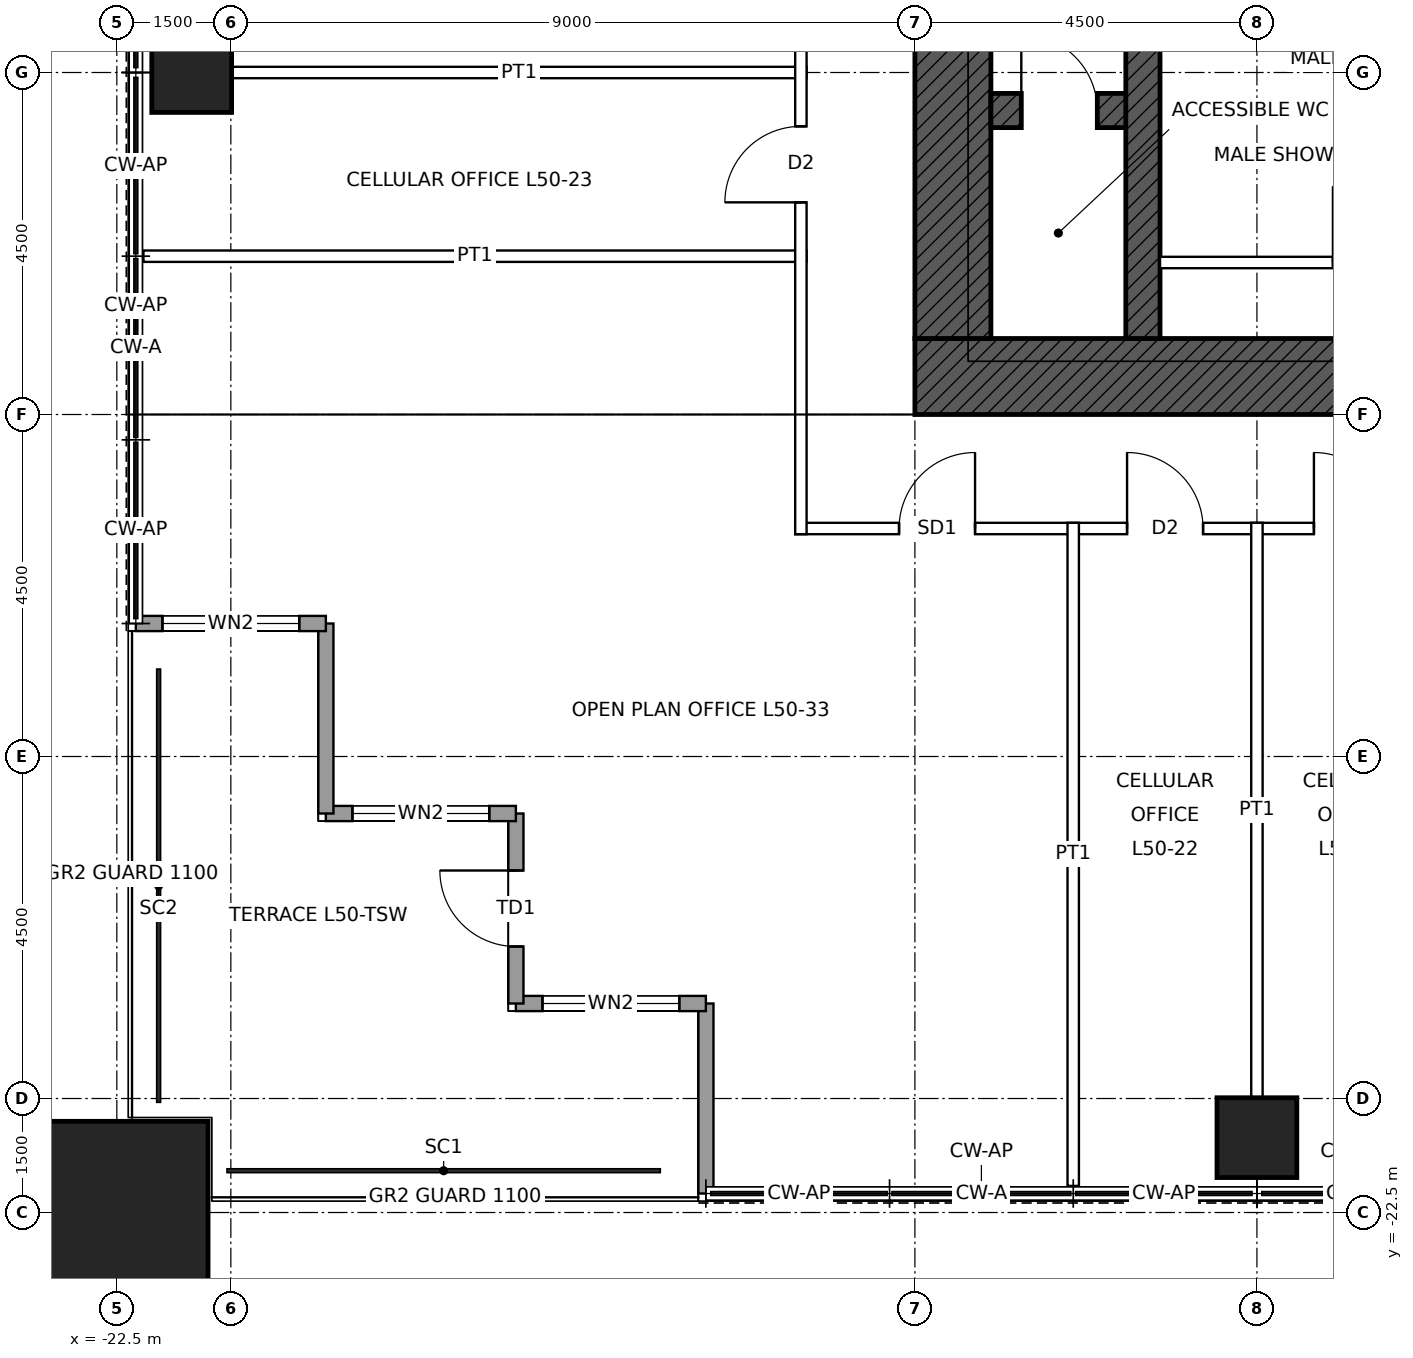
"""IFC4 building model, lengths in metres.
Left out: names, types, materials, properties, quantities, classifications, styles, units other than length and angle.
Written with IfcOpenShell. Run it as: python <this file> out.ifc"""

import sys

from ifc_helpers import new_model, si_unit, direction, frame, frame_2d, origin, origin_2d, place, context, subcontext, project, spatial, rectangle, hollow_rectangle, extrude, element, fill, save


model = new_model("IFC4")
c1 = context("Model", 3, precision=1e-05, world=origin(), true_north=direction((0.0, 1.0)))
c2 = subcontext(c1, "Body", "Model", "MODEL_VIEW")
j1 = project(units=[si_unit("LENGTHUNIT", "METRE"), si_unit("PLANEANGLEUNIT", "RADIAN")], contexts=[c1])
p1 = place(None, origin())
s1 = spatial("IfcSite", under=j1, at=p1, CompositionType="ELEMENT")
p2 = place(p1, origin())
s2 = spatial("IfcBuilding", under=s1, at=p2, CompositionType="ELEMENT")
p3 = place(p2, frame((0.0, 0.0, 233.9)))
s3 = spatial("IfcBuildingStorey", under=s2, at=p3, CompositionType="ELEMENT", Elevation=233.9)
p4 = place(p3, frame((-22.5, -22.5, 0.0), z_axis=(0.0, 0.0, 1.0), x_axis=(1.0, 0.0, 0.0)))
e1 = element("IfcColumn", 1, at=p4, inside=s3, PredefinedType="COLUMN", context=c2, shape_type="SweptSolid", body=[
    extrude(hollow_rectangle(XDim=2.4, YDim=2.4, WallThickness=0.12, at=origin_2d()), origin(), (0.0, 0.0, 1.0), 4.0),
])
for number, where, z_axis, x_axis in (
    (2, (-7.5, -21.515, 0.0), (0.0, 0.0, 1.0), (1.0, 0.0, 0.0)),
    (3, (-21.515, -7.5, 0.0), (0.0, 0.0, 1.0), (1.0, 0.0, 0.0)),
):
    element("IfcColumn", number, at=place(p3, frame(where, z_axis=z_axis, x_axis=x_axis)), inside=s3, PredefinedType="COLUMN", context=c2, shape_type="SweptSolid", body=[
        extrude(hollow_rectangle(XDim=1.05, YDim=1.05, WallThickness=0.07, at=origin_2d()), origin(), (0.0, 0.0, 1.0), 4.0),
    ])
p5 = place(p3, frame((12.0, -11.5, 0.0), z_axis=(0.0, 0.0, 1.0), x_axis=(-1.0, 0.0, 0.0)))
e4 = element("IfcWall", 4, at=p5, inside=s3, PredefinedType="SHEAR", context=c2, shape_type="SweptSolid", body=[
    extrude(rectangle(XDim=24.0, YDim=1.0, at=frame_2d((12.0, 0.0))), origin(), (0.0, 0.0, 1.0), 4.0),
])
p6 = place(p5, frame((11.5, 0.0, 0.0)))
e5 = element("IfcOpeningElement", 5, at=p6, cuts=e4, PredefinedType="OPENING", context=c2, shape_type="SweptSolid", body=[
    extrude(rectangle(XDim=1.0, YDim=2.1, at=frame_2d((0.5, 1.05))), frame((0.0, 0.51, 0.0), z_axis=(0.0, -1.0, 0.0), x_axis=(1.0, 0.0, 0.0)), (0.0, 0.0, 1.0), 1.02),
])
p7 = place(p5, frame((1.0, 0.0, 0.0)))
e6 = element("IfcOpeningElement", 6, at=p7, cuts=e4, PredefinedType="OPENING", context=c2, shape_type="SweptSolid", body=[
    extrude(rectangle(XDim=1.0, YDim=2.4, at=frame_2d((0.5, 1.2))), frame((0.0, 0.51, 0.0), z_axis=(0.0, -1.0, 0.0), x_axis=(1.0, 0.0, 0.0)), (0.0, 0.0, 1.0), 1.02),
])
p8 = place(p3, frame((-11.5, -11.0, 0.0), z_axis=(0.0, 0.0, 1.0), x_axis=(0.0, 1.0, 0.0)))
e7 = element("IfcWall", 7, at=p8, inside=s3, PredefinedType="SHEAR", context=c2, shape_type="SweptSolid", body=[
    extrude(rectangle(XDim=22.0, YDim=1.0, at=frame_2d((11.0, 0.0))), origin(), (0.0, 0.0, 1.0), 4.0),
])
p9 = place(p8, frame((10.5, 0.0, 0.0)))
e8 = element("IfcOpeningElement", 8, at=p9, cuts=e7, PredefinedType="OPENING", context=c2, shape_type="SweptSolid", body=[
    extrude(rectangle(XDim=1.0, YDim=2.4, at=frame_2d((0.5, 1.2))), frame((0.0, 0.51, 0.0), z_axis=(0.0, -1.0, 0.0), x_axis=(1.0, 0.0, 0.0)), (0.0, 0.0, 1.0), 1.02),
])
p10 = place(p3, frame((-11.0, -8.0, 0.0), z_axis=(0.0, 0.0, 1.0), x_axis=(1.0, 0.0, 0.0)))
e9 = element("IfcWall", 9, at=p10, inside=s3, PredefinedType="SHEAR", context=c2, shape_type="SweptSolid", body=[
    extrude(rectangle(XDim=2.0, YDim=0.45, at=frame_2d((1.0, 0.0))), origin(), (0.0, 0.0, 1.0), 4.0),
])
p11 = place(p10, frame((0.4, 0.0, 0.0)))
e10 = element("IfcOpeningElement", 10, at=p11, cuts=e9, PredefinedType="OPENING", context=c2, shape_type="SweptSolid", body=[
    extrude(rectangle(XDim=1.0, YDim=2.1, at=frame_2d((0.5, 1.05))), frame((0.0, 0.235, 0.0), z_axis=(0.0, -1.0, 0.0), x_axis=(1.0, 0.0, 0.0)), (0.0, 0.0, 1.0), 0.47),
])
p12 = place(p3, frame((-9.0, -11.0, 0.0), z_axis=(0.0, 0.0, 1.0), x_axis=(0.0, 1.0, 0.0)))
e11 = element("IfcWall", 11, at=p12, inside=s3, PredefinedType="SHEAR", context=c2, shape_type="SweptSolid", body=[
    extrude(rectangle(XDim=6.5, YDim=0.45, at=frame_2d((3.25, 0.0))), origin(), (0.0, 0.0, 1.0), 4.0),
])
p13 = place(p12, frame((4.25, 0.0, 0.0)))
e12 = element("IfcOpeningElement", 12, at=p13, cuts=e11, PredefinedType="OPENING", context=c2, shape_type="SweptSolid", body=[
    extrude(rectangle(XDim=1.0, YDim=2.1, at=frame_2d((0.5, 1.05))), frame((0.0, 0.235, 0.0), z_axis=(0.0, -1.0, 0.0), x_axis=(1.0, 0.0, 0.0)), (0.0, 0.0, 1.0), 0.47),
])
p14 = place(p3, frame((-14.75, -22.25, 0.0), z_axis=(0.0, 0.0, 1.0), x_axis=(0.0, 1.0, 0.0)))
e13 = element("IfcWall", 13, at=p14, inside=s3, PredefinedType="SOLIDWALL", context=c2, shape_type="SweptSolid", body=[
    extrude(rectangle(XDim=2.5, YDim=0.2, at=frame_2d((1.25, 0.0))), origin(), (0.0, 0.0, 1.0), 3.85),
])
p15 = place(p3, frame((-14.75, -19.75, 0.0), z_axis=(0.0, 0.0, 1.0), x_axis=(-1.0, 0.0, 0.0)))
e14 = element("IfcWall", 14, at=p15, inside=s3, PredefinedType="SOLIDWALL", context=c2, shape_type="SweptSolid", body=[
    extrude(rectangle(XDim=2.5, YDim=0.2, at=frame_2d((1.25, 0.0))), origin(), (0.0, 0.0, 1.0), 3.85),
])
p16 = place(p15, frame((0.35, 0.0, 0.3)))
e15 = element("IfcOpeningElement", 15, at=p16, cuts=e14, PredefinedType="OPENING", context=c2, shape_type="SweptSolid", body=[
    extrude(rectangle(XDim=1.8, YDim=2.4, at=frame_2d((0.9, 1.2))), frame((0.0, 0.11, 0.0), z_axis=(0.0, -1.0, 0.0), x_axis=(1.0, 0.0, 0.0)), (0.0, 0.0, 1.0), 0.22),
])
p17 = place(p3, frame((-17.25, -19.75, 0.0), z_axis=(0.0, 0.0, 1.0), x_axis=(0.0, 1.0, 0.0)))
e16 = element("IfcWall", 16, at=p17, inside=s3, PredefinedType="SOLIDWALL", context=c2, shape_type="SweptSolid", body=[
    extrude(rectangle(XDim=2.5, YDim=0.2, at=frame_2d((1.25, 0.0))), origin(), (0.0, 0.0, 1.0), 3.85),
])
p18 = place(p17, frame((0.75, 0.0, 0.0)))
e17 = element("IfcOpeningElement", 17, at=p18, cuts=e16, PredefinedType="OPENING", context=c2, shape_type="SweptSolid", body=[
    extrude(rectangle(XDim=1.0, YDim=2.4, at=frame_2d((0.5, 1.2))), frame((0.0, 0.11, 0.0), z_axis=(0.0, -1.0, 0.0), x_axis=(1.0, 0.0, 0.0)), (0.0, 0.0, 1.0), 0.22),
])
p19 = place(p3, frame((-17.25, -17.25, 0.0), z_axis=(0.0, 0.0, 1.0), x_axis=(-1.0, 0.0, 0.0)))
e18 = element("IfcWall", 18, at=p19, inside=s3, PredefinedType="SOLIDWALL", context=c2, shape_type="SweptSolid", body=[
    extrude(rectangle(XDim=2.5, YDim=0.2, at=frame_2d((1.25, 0.0))), origin(), (0.0, 0.0, 1.0), 3.85),
])
p20 = place(p19, frame((0.35, 0.0, 0.3)))
e19 = element("IfcOpeningElement", 19, at=p20, cuts=e18, PredefinedType="OPENING", context=c2, shape_type="SweptSolid", body=[
    extrude(rectangle(XDim=1.8, YDim=2.4, at=frame_2d((0.9, 1.2))), frame((0.0, 0.11, 0.0), z_axis=(0.0, -1.0, 0.0), x_axis=(1.0, 0.0, 0.0)), (0.0, 0.0, 1.0), 0.22),
])
p21 = place(p3, frame((-19.75, -17.25, 0.0), z_axis=(0.0, 0.0, 1.0), x_axis=(0.0, 1.0, 0.0)))
e20 = element("IfcWall", 20, at=p21, inside=s3, PredefinedType="SOLIDWALL", context=c2, shape_type="SweptSolid", body=[
    extrude(rectangle(XDim=2.5, YDim=0.2, at=frame_2d((1.25, 0.0))), origin(), (0.0, 0.0, 1.0), 3.85),
])
p22 = place(p3, frame((-19.75, -14.75, 0.0), z_axis=(0.0, 0.0, 1.0), x_axis=(-1.0, 0.0, 0.0)))
e21 = element("IfcWall", 21, at=p22, inside=s3, PredefinedType="SOLIDWALL", context=c2, shape_type="SweptSolid", body=[
    extrude(rectangle(XDim=2.5, YDim=0.2, at=frame_2d((1.25, 0.0))), origin(), (0.0, 0.0, 1.0), 3.85),
])
p23 = place(p22, frame((0.35, 0.0, 0.3)))
e22 = element("IfcOpeningElement", 22, at=p23, cuts=e21, PredefinedType="OPENING", context=c2, shape_type="SweptSolid", body=[
    extrude(rectangle(XDim=1.8, YDim=2.4, at=frame_2d((0.9, 1.2))), frame((0.0, 0.11, 0.0), z_axis=(0.0, -1.0, 0.0), x_axis=(1.0, 0.0, 0.0)), (0.0, 0.0, 1.0), 0.22),
])
p24 = place(p3, frame((-13.575, -13.5, 0.0), z_axis=(0.0, 0.0, 1.0), x_axis=(1.0, 0.0, 0.0)))
e23 = element("IfcWall", 23, at=p24, inside=s3, PredefinedType="PARTITIONING", context=c2, shape_type="SweptSolid", body=[
    extrude(rectangle(XDim=27.15, YDim=0.15, at=frame_2d((13.575, 0.0))), origin(), (0.0, 0.0, 1.0), 3.85),
])
p25 = place(p24, frame((21.783, 0.0, 0.0)))
e24 = element("IfcOpeningElement", 24, at=p25, cuts=e23, PredefinedType="OPENING", context=c2, shape_type="SweptSolid", body=[
    extrude(rectangle(XDim=1.0, YDim=2.1, at=frame_2d((0.5, 1.05))), frame((0.0, 0.085, 0.0), z_axis=(0.0, -1.0, 0.0), x_axis=(1.0, 0.0, 0.0)), (0.0, 0.0, 1.0), 0.17),
])
p26 = place(p24, frame((19.325, 0.0, 0.0)))
e25 = element("IfcOpeningElement", 25, at=p26, cuts=e23, PredefinedType="OPENING", context=c2, shape_type="SweptSolid", body=[
    extrude(rectangle(XDim=1.0, YDim=2.1, at=frame_2d((0.5, 1.05))), frame((0.0, 0.085, 0.0), z_axis=(0.0, -1.0, 0.0), x_axis=(1.0, 0.0, 0.0)), (0.0, 0.0, 1.0), 0.17),
])
p27 = place(p24, frame((16.825, 0.0, 0.0)))
e26 = element("IfcOpeningElement", 26, at=p27, cuts=e23, PredefinedType="OPENING", context=c2, shape_type="SweptSolid", body=[
    extrude(rectangle(XDim=1.0, YDim=2.1, at=frame_2d((0.5, 1.05))), frame((0.0, 0.085, 0.0), z_axis=(0.0, -1.0, 0.0), x_axis=(1.0, 0.0, 0.0)), (0.0, 0.0, 1.0), 0.17),
])
p28 = place(p24, frame((14.675, 0.0, 0.0)))
e27 = element("IfcOpeningElement", 27, at=p28, cuts=e23, PredefinedType="OPENING", context=c2, shape_type="SweptSolid", body=[
    extrude(rectangle(XDim=1.0, YDim=2.1, at=frame_2d((0.5, 1.05))), frame((0.0, 0.085, 0.0), z_axis=(0.0, -1.0, 0.0), x_axis=(1.0, 0.0, 0.0)), (0.0, 0.0, 1.0), 0.17),
])
p29 = place(p24, frame((11.475, 0.0, 0.0)))
e28 = element("IfcOpeningElement", 28, at=p29, cuts=e23, PredefinedType="OPENING", context=c2, shape_type="SweptSolid", body=[
    extrude(rectangle(XDim=1.0, YDim=2.1, at=frame_2d((0.5, 1.05))), frame((0.0, 0.085, 0.0), z_axis=(0.0, -1.0, 0.0), x_axis=(1.0, 0.0, 0.0)), (0.0, 0.0, 1.0), 0.17),
])
p30 = place(p24, frame((9.325, 0.0, 0.0)))
e29 = element("IfcOpeningElement", 29, at=p30, cuts=e23, PredefinedType="OPENING", context=c2, shape_type="SweptSolid", body=[
    extrude(rectangle(XDim=1.0, YDim=2.1, at=frame_2d((0.5, 1.05))), frame((0.0, 0.085, 0.0), z_axis=(0.0, -1.0, 0.0), x_axis=(1.0, 0.0, 0.0)), (0.0, 0.0, 1.0), 0.17),
])
p31 = place(p24, frame((6.825, 0.0, 0.0)))
e30 = element("IfcOpeningElement", 30, at=p31, cuts=e23, PredefinedType="OPENING", context=c2, shape_type="SweptSolid", body=[
    extrude(rectangle(XDim=1.0, YDim=2.1, at=frame_2d((0.5, 1.05))), frame((0.0, 0.085, 0.0), z_axis=(0.0, -1.0, 0.0), x_axis=(1.0, 0.0, 0.0)), (0.0, 0.0, 1.0), 0.17),
])
p32 = place(p24, frame((4.366, 0.0, 0.0)))
e31 = element("IfcOpeningElement", 31, at=p32, cuts=e23, PredefinedType="OPENING", context=c2, shape_type="SweptSolid", body=[
    extrude(rectangle(XDim=1.0, YDim=2.1, at=frame_2d((0.5, 1.05))), frame((0.0, 0.085, 0.0), z_axis=(0.0, -1.0, 0.0), x_axis=(1.0, 0.0, 0.0)), (0.0, 0.0, 1.0), 0.17),
])
p33 = place(p24, frame((25.318, 0.0, 0.0)))
e32 = element("IfcOpeningElement", 32, at=p33, cuts=e23, PredefinedType="OPENING", context=c2, shape_type="SweptSolid", body=[
    extrude(rectangle(XDim=1.0, YDim=2.4, at=frame_2d((0.5, 1.2))), frame((0.0, 0.085, 0.0), z_axis=(0.0, -1.0, 0.0), x_axis=(1.0, 0.0, 0.0)), (0.0, 0.0, 1.0), 0.17),
])
p34 = place(p24, frame((1.366, 0.0, 0.0)))
e33 = element("IfcOpeningElement", 33, at=p34, cuts=e23, PredefinedType="OPENING", context=c2, shape_type="SweptSolid", body=[
    extrude(rectangle(XDim=1.0, YDim=2.4, at=frame_2d((0.5, 1.2))), frame((0.0, 0.085, 0.0), z_axis=(0.0, -1.0, 0.0), x_axis=(1.0, 0.0, 0.0)), (0.0, 0.0, 1.0), 0.17),
])
p35 = place(p3, frame((-22.15, -9.917, 0.0), z_axis=(0.0, 0.0, 1.0), x_axis=(1.0, 0.0, 0.0)))
e34 = element("IfcWall", 34, at=p35, inside=s3, PredefinedType="PARTITIONING", context=c2, shape_type="SweptSolid", body=[
    extrude(rectangle(XDim=8.725, YDim=0.15, at=frame_2d((4.362, 0.0))), origin(), (0.0, 0.0, 1.0), 3.85),
])
p36 = place(p3, frame((-20.99, -7.5, 0.0), z_axis=(0.0, 0.0, 1.0), x_axis=(1.0, 0.0, 0.0)))
e35 = element("IfcWall", 35, at=p36, inside=s3, PredefinedType="PARTITIONING", context=c2, shape_type="SweptSolid", body=[
    extrude(rectangle(XDim=7.565, YDim=0.15, at=frame_2d((3.782, 0.0))), origin(), (0.0, 0.0, 1.0), 3.238),
])
p37 = place(p3, frame((-13.5, -13.575, 0.0), z_axis=(0.0, 0.0, 1.0), x_axis=(0.0, 1.0, 0.0)))
e36 = element("IfcWall", 36, at=p37, inside=s3, PredefinedType="PARTITIONING", context=c2, shape_type="SweptSolid", body=[
    extrude(rectangle(XDim=13.65, YDim=0.15, at=frame_2d((6.825, 0.0))), origin(), (0.0, 0.0, 1.0), 3.85),
])
p38 = place(p37, frame((4.366, 0.0, 0.0)))
e37 = element("IfcOpeningElement", 37, at=p38, cuts=e36, PredefinedType="OPENING", context=c2, shape_type="SweptSolid", body=[
    extrude(rectangle(XDim=1.0, YDim=2.1, at=frame_2d((0.5, 1.05))), frame((0.0, 0.085, 0.0), z_axis=(0.0, -1.0, 0.0), x_axis=(1.0, 0.0, 0.0)), (0.0, 0.0, 1.0), 0.17),
])
p39 = place(p37, frame((6.825, 0.0, 0.0)))
e38 = element("IfcOpeningElement", 38, at=p39, cuts=e36, PredefinedType="OPENING", context=c2, shape_type="SweptSolid", body=[
    extrude(rectangle(XDim=1.0, YDim=2.1, at=frame_2d((0.5, 1.05))), frame((0.0, 0.085, 0.0), z_axis=(0.0, -1.0, 0.0), x_axis=(1.0, 0.0, 0.0)), (0.0, 0.0, 1.0), 0.17),
])
p40 = place(p37, frame((9.325, 0.0, 0.0)))
e39 = element("IfcOpeningElement", 39, at=p40, cuts=e36, PredefinedType="OPENING", context=c2, shape_type="SweptSolid", body=[
    extrude(rectangle(XDim=1.0, YDim=2.1, at=frame_2d((0.5, 1.05))), frame((0.0, 0.085, 0.0), z_axis=(0.0, -1.0, 0.0), x_axis=(1.0, 0.0, 0.0)), (0.0, 0.0, 1.0), 0.17),
])
p41 = place(p37, frame((11.475, 0.0, 0.0)))
e40 = element("IfcOpeningElement", 40, at=p41, cuts=e36, PredefinedType="OPENING", context=c2, shape_type="SweptSolid", body=[
    extrude(rectangle(XDim=1.0, YDim=2.1, at=frame_2d((0.5, 1.05))), frame((0.0, 0.085, 0.0), z_axis=(0.0, -1.0, 0.0), x_axis=(1.0, 0.0, 0.0)), (0.0, 0.0, 1.0), 0.17),
])
p42 = place(p3, frame((-9.917, -22.15, 0.0), z_axis=(0.0, 0.0, 1.0), x_axis=(0.0, 1.0, 0.0)))
e41 = element("IfcWall", 41, at=p42, inside=s3, PredefinedType="PARTITIONING", context=c2, shape_type="SweptSolid", body=[
    extrude(rectangle(XDim=8.725, YDim=0.15, at=frame_2d((4.362, 0.0))), origin(), (0.0, 0.0, 1.0), 3.85),
])
p43 = place(p3, frame((-7.5, -20.99, 0.0), z_axis=(0.0, 0.0, 1.0), x_axis=(0.0, 1.0, 0.0)))
e42 = element("IfcWall", 42, at=p43, inside=s3, PredefinedType="PARTITIONING", context=c2, shape_type="SweptSolid", body=[
    extrude(rectangle(XDim=7.565, YDim=0.15, at=frame_2d((3.782, 0.0))), origin(), (0.0, 0.0, 1.0), 3.238),
])
p44 = place(p3, frame((-8.775, -10.0, 0.0), z_axis=(0.0, 0.0, 1.0), x_axis=(1.0, 0.0, 0.0)))
e43 = element("IfcWall", 43, at=p44, inside=s3, PredefinedType="PARTITIONING", context=c2, shape_type="SweptSolid", body=[
    extrude(rectangle(XDim=5.55, YDim=0.15, at=frame_2d((2.775, 0.0))), origin(), (0.0, 0.0, 1.0), 3.75),
])
p45 = place(p44, frame((2.275, 0.0, 0.0)))
e44 = element("IfcOpeningElement", 44, at=p45, cuts=e43, PredefinedType="OPENING", context=c2, shape_type="SweptSolid", body=[
    extrude(rectangle(XDim=1.0, YDim=2.1, at=frame_2d((0.5, 1.05))), frame((0.0, 0.085, 0.0), z_axis=(0.0, -1.0, 0.0), x_axis=(1.0, 0.0, 0.0)), (0.0, 0.0, 1.0), 0.17),
])
p46 = place(p16, origin())
e45 = element("IfcWindow", 45, at=p46, inside=s3, PartitioningType="SINGLE_PANEL", PredefinedType="WINDOW", context=c2, shape_type="SweptSolid", body=[
    extrude(rectangle(XDim=1.8, YDim=2.4, at=frame_2d((0.9, 1.2))), frame((0.0, 0.03, 0.0), z_axis=(0.0, -1.0, 0.0), x_axis=(1.0, 0.0, 0.0)), (0.0, 0.0, 1.0), 0.06),
])
fill(e15, e45)
p47 = place(p18, origin())
e46 = element("IfcDoor", 46, at=p47, inside=s3, OperationType="SINGLE_SWING_RIGHT", PredefinedType="DOOR", context=c2, shape_type="SweptSolid", body=[
    extrude(rectangle(XDim=1.0, YDim=2.4, at=frame_2d((0.5, 1.2))), frame((0.0, 0.025, 0.0), z_axis=(0.0, -1.0, 0.0), x_axis=(1.0, 0.0, 0.0)), (0.0, 0.0, 1.0), 0.05),
])
fill(e17, e46)
p48 = place(p20, origin())
e47 = element("IfcWindow", 47, at=p48, inside=s3, PartitioningType="SINGLE_PANEL", PredefinedType="WINDOW", context=c2, shape_type="SweptSolid", body=[
    extrude(rectangle(XDim=1.8, YDim=2.4, at=frame_2d((0.9, 1.2))), frame((0.0, 0.03, 0.0), z_axis=(0.0, -1.0, 0.0), x_axis=(1.0, 0.0, 0.0)), (0.0, 0.0, 1.0), 0.06),
])
fill(e19, e47)
p49 = place(p23, origin())
e48 = element("IfcWindow", 48, at=p49, inside=s3, PartitioningType="SINGLE_PANEL", PredefinedType="WINDOW", context=c2, shape_type="SweptSolid", body=[
    extrude(rectangle(XDim=1.8, YDim=2.4, at=frame_2d((0.9, 1.2))), frame((0.0, 0.03, 0.0), z_axis=(0.0, -1.0, 0.0), x_axis=(1.0, 0.0, 0.0)), (0.0, 0.0, 1.0), 0.06),
])
fill(e22, e48)
p50 = place(p11, origin())
e49 = element("IfcDoor", 49, at=p50, inside=s3, OperationType="SINGLE_SWING_LEFT", PredefinedType="DOOR", context=c2, shape_type="SweptSolid", body=[
    extrude(rectangle(XDim=1.0, YDim=2.1, at=frame_2d((0.5, 1.05))), frame((0.0, 0.025, 0.0), z_axis=(0.0, -1.0, 0.0), x_axis=(1.0, 0.0, 0.0)), (0.0, 0.0, 1.0), 0.05),
])
fill(e10, e49)
p51 = place(p31, origin())
e50 = element("IfcDoor", 50, at=p51, inside=s3, OperationType="SINGLE_SWING_LEFT", PredefinedType="DOOR", context=c2, shape_type="SweptSolid", body=[
    extrude(rectangle(XDim=1.0, YDim=2.1, at=frame_2d((0.5, 1.05))), frame((0.0, 0.025, 0.0), z_axis=(0.0, -1.0, 0.0), x_axis=(1.0, 0.0, 0.0)), (0.0, 0.0, 1.0), 0.05),
])
fill(e30, e50)
p52 = place(p32, origin())
e51 = element("IfcDoor", 51, at=p52, inside=s3, OperationType="SINGLE_SWING_LEFT", PredefinedType="DOOR", context=c2, shape_type="SweptSolid", body=[
    extrude(rectangle(XDim=1.0, YDim=2.1, at=frame_2d((0.5, 1.05))), frame((0.0, 0.025, 0.0), z_axis=(0.0, -1.0, 0.0), x_axis=(1.0, 0.0, 0.0)), (0.0, 0.0, 1.0), 0.05),
])
fill(e31, e51)
p53 = place(p38, origin())
e52 = element("IfcDoor", 52, at=p53, inside=s3, OperationType="SINGLE_SWING_LEFT", PredefinedType="DOOR", context=c2, shape_type="SweptSolid", body=[
    extrude(rectangle(XDim=1.0, YDim=2.1, at=frame_2d((0.5, 1.05))), frame((0.0, 0.025, 0.0), z_axis=(0.0, -1.0, 0.0), x_axis=(1.0, 0.0, 0.0)), (0.0, 0.0, 1.0), 0.05),
])
fill(e37, e52)
p54 = place(p34, origin())
e53 = element("IfcDoor", 53, at=p54, inside=s3, OperationType="SINGLE_SWING_RIGHT", PredefinedType="DOOR", context=c2, shape_type="SweptSolid", body=[
    extrude(rectangle(XDim=1.0, YDim=2.4, at=frame_2d((0.5, 1.2))), frame((0.0, 0.025, 0.0), z_axis=(0.0, -1.0, 0.0), x_axis=(1.0, 0.0, 0.0)), (0.0, 0.0, 1.0), 0.05),
])
fill(e33, e53)
save(model, sys.argv[1])
